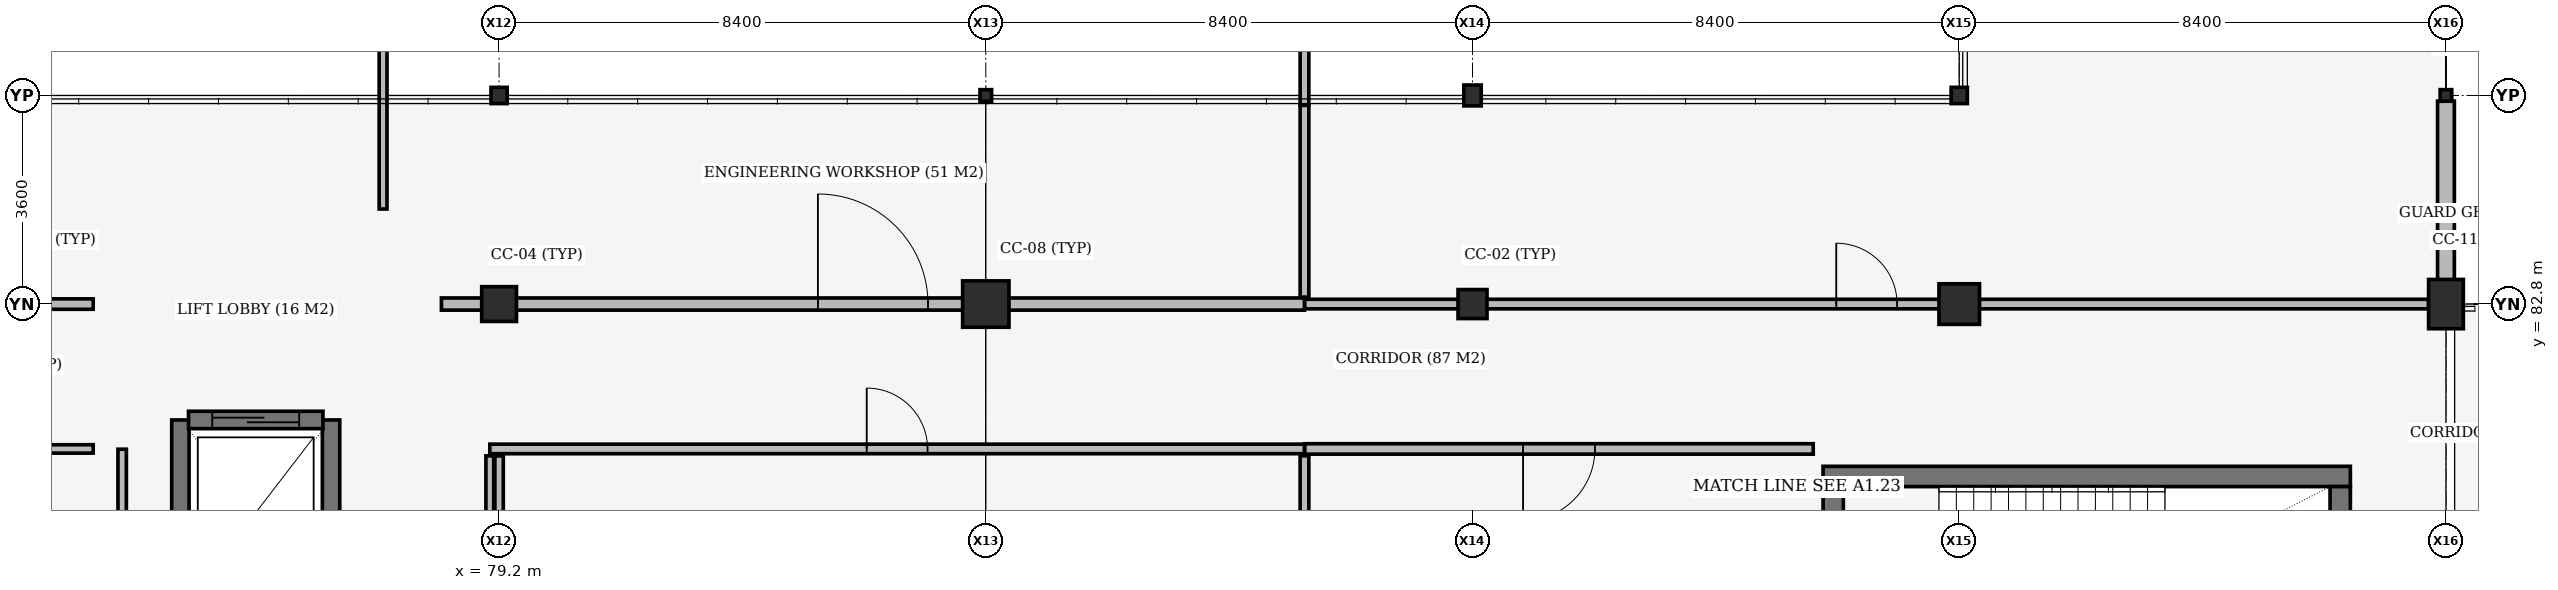
"""IFC4 building model, lengths in metres.
Left out: names, types, materials, properties, quantities, classifications, styles, units other than length and angle.
Written with IfcOpenShell. Run it as: python <this file> out.ifc"""

import sys

from ifc_helpers import new_model, si_unit, direction, frame, frame_2d, origin, origin_2d, place, context, subcontext, project, spatial, rectangle, i_section, extrude, element, fill, save


model = new_model("IFC4")
c1 = context("Model", 3, precision=1e-05, world=origin(), true_north=direction((0.0, 1.0)))
c2 = subcontext(c1, "Body", "Model", "MODEL_VIEW")
j1 = project(units=[si_unit("LENGTHUNIT", "METRE"), si_unit("PLANEANGLEUNIT", "RADIAN")], contexts=[c1])
p1 = place(None, origin())
s1 = spatial("IfcSite", under=j1, at=p1, CompositionType="ELEMENT")
p2 = place(p1, origin())
s2 = spatial("IfcBuilding", under=s1, at=p2, CompositionType="ELEMENT")
p3 = place(p2, frame((0.0, 0.0, 5.4)))
s3 = spatial("IfcBuildingStorey", under=s2, at=p3, CompositionType="ELEMENT", Elevation=5.4)
p4 = place(p3, frame((79.2, 82.8, 0.0), z_axis=(0.0, 0.0, 1.0), x_axis=(1.0, 0.0, 0.0)))
e1 = element("IfcColumn", 1, at=p4, inside=s3, PredefinedType="COLUMN", context=c2, shape_type="SweptSolid", body=[
    extrude(rectangle(XDim=0.6, YDim=0.6, at=origin_2d()), origin(), (0.0, 0.0, 1.0), 3.92),
])
p5 = place(p3, frame((79.2, 86.4, 0.0), z_axis=(0.0, 0.0, 1.0), x_axis=(1.0, 0.0, 0.0)))
e2 = element("IfcColumn", 2, at=p5, inside=s3, PredefinedType="COLUMN", context=c2, shape_type="SweptSolid", body=[
    extrude(i_section(OverallWidth=0.28, OverallDepth=0.28, WebThickness=0.01, FlangeThickness=0.018, FilletRadius=0.024, at=origin_2d()), origin(), (0.0, 0.0, 1.0), 3.92),
])
p6 = place(p3, frame((87.6, 82.8, 0.0), z_axis=(0.0, 0.0, 1.0), x_axis=(1.0, 0.0, 0.0)))
e3 = element("IfcColumn", 3, at=p6, inside=s3, PredefinedType="COLUMN", context=c2, shape_type="SweptSolid", body=[
    extrude(rectangle(XDim=0.8, YDim=0.8, at=origin_2d()), origin(), (0.0, 0.0, 1.0), 3.92),
])
p7 = place(p3, frame((87.6, 86.4, 0.0), z_axis=(0.0, 0.0, 1.0), x_axis=(1.0, 0.0, 0.0)))
e4 = element("IfcColumn", 4, at=p7, inside=s3, PredefinedType="COLUMN", context=c2, shape_type="SweptSolid", body=[
    extrude(i_section(OverallWidth=0.2, OverallDepth=0.2, WebThickness=0.009, FlangeThickness=0.015, FilletRadius=0.018, at=origin_2d()), origin(), (0.0, 0.0, 1.0), 3.92),
])
p8 = place(p3, frame((96.0, 82.8, 0.0), z_axis=(0.0, 0.0, 1.0), x_axis=(1.0, 0.0, 0.0)))
e5 = element("IfcColumn", 5, at=p8, inside=s3, PredefinedType="COLUMN", context=c2, shape_type="SweptSolid", body=[
    extrude(rectangle(XDim=0.5, YDim=0.5, at=origin_2d()), origin(), (0.0, 0.0, 1.0), 3.92),
])
p9 = place(p3, frame((96.0, 86.4, 0.0), z_axis=(0.0, 0.0, 1.0), x_axis=(1.0, 0.0, 0.0)))
e6 = element("IfcColumn", 6, at=p9, inside=s3, PredefinedType="COLUMN", context=c2, shape_type="SweptSolid", body=[
    extrude(i_section(OverallWidth=0.3, OverallDepth=0.36, WebThickness=0.012, FlangeThickness=0.022, FilletRadius=0.027, at=origin_2d()), origin(), (0.0, 0.0, 1.0), 3.92),
])
p10 = place(p3, frame((104.4, 82.8, 0.0), z_axis=(0.0, 0.0, 1.0), x_axis=(1.0, 0.0, 0.0)))
e7 = element("IfcColumn", 7, at=p10, inside=s3, PredefinedType="COLUMN", context=c2, shape_type="SweptSolid", body=[
    extrude(rectangle(XDim=0.7, YDim=0.7, at=origin_2d()), origin(), (0.0, 0.0, 1.0), 3.92),
])
p11 = place(p3, frame((104.4, 86.4, 0.0), z_axis=(0.0, 0.0, 1.0), x_axis=(1.0, 0.0, 0.0)))
e8 = element("IfcColumn", 8, at=p11, inside=s3, PredefinedType="COLUMN", context=c2, shape_type="SweptSolid", body=[
    extrude(i_section(OverallWidth=0.28, OverallDepth=0.28, WebThickness=0.01, FlangeThickness=0.018, FilletRadius=0.024, at=origin_2d()), origin(), (0.0, 0.0, 1.0), 3.92),
])
p12 = place(p3, frame((112.8, 82.8, 0.0), z_axis=(0.0, 0.0, 1.0), x_axis=(1.0, 0.0, 0.0)))
e9 = element("IfcColumn", 9, at=p12, inside=s3, PredefinedType="COLUMN", context=c2, shape_type="SweptSolid", body=[
    extrude(rectangle(XDim=0.6, YDim=0.85, at=origin_2d()), origin(), (0.0, 0.0, 1.0), 3.92),
])
p13 = place(p3, frame((112.8, 86.4, 0.0), z_axis=(0.0, 0.0, 1.0), x_axis=(1.0, 0.0, 0.0)))
e10 = element("IfcColumn", 10, at=p13, inside=s3, PredefinedType="COLUMN", context=c2, shape_type="SweptSolid", body=[
    extrude(i_section(OverallWidth=0.2, OverallDepth=0.2, WebThickness=0.009, FlangeThickness=0.015, FilletRadius=0.018, at=origin_2d()), origin(), (0.0, 0.0, 1.0), 3.92),
])
p14 = place(p3, frame((111.15, 79.825, 0.0), z_axis=(0.0, 0.0, 1.0), x_axis=(-1.0, 0.0, 0.0)))
e11 = element("IfcWall", 11, at=p14, inside=s3, PredefinedType="SHEAR", context=c2, shape_type="SweptSolid", body=[
    extrude(rectangle(XDim=9.1, YDim=0.35, at=frame_2d((4.55, 0.0))), origin(), (0.0, 0.0, 1.0), 3.92),
])
p15 = place(p3, frame((110.975, 76.2, 0.0), z_axis=(0.0, 0.0, 1.0), x_axis=(0.0, 1.0, 0.0)))
e12 = element("IfcWall", 12, at=p15, inside=s3, PredefinedType="SHEAR", context=c2, shape_type="SweptSolid", body=[
    extrude(rectangle(XDim=3.45, YDim=0.35, at=frame_2d((1.725, 0.0))), origin(), (0.0, 0.0, 1.0), 3.92),
])
for number, where, z_axis, x_axis in (
    (13, (73.7, 80.8, 0.0), (0.0, 0.0, 1.0), (0.0, -1.0, 0.0)),
    (14, (76.3, 77.6, 0.0), (0.0, 0.0, 1.0), (0.0, 1.0, 0.0)),
):
    element("IfcWall", number, at=place(p3, frame(where, z_axis=z_axis, x_axis=x_axis)), inside=s3, PredefinedType="SHEAR", context=c2, shape_type="SweptSolid", body=[
        extrude(rectangle(XDim=3.2, YDim=0.3, at=frame_2d((1.6, 0.0))), origin(), (0.0, 0.0, 1.0), 3.92),
    ])
p16 = place(p3, frame((112.8, 86.303, 0.0), z_axis=(0.0, 0.0, 1.0), x_axis=(0.0, -1.0, 0.0)))
e15 = element("IfcWall", 15, at=p16, inside=s3, PredefinedType="STANDARD", context=c2, shape_type="SweptSolid", body=[
    extrude(rectangle(XDim=3.086, YDim=0.29, at=frame_2d((1.543, 0.0))), origin(), (0.0, 0.0, 1.0), 3.53),
])
p17 = place(p3, frame((102.225, 79.65, 0.0), z_axis=(0.0, 0.0, 1.0), x_axis=(0.0, -1.0, 0.0)))
e16 = element("IfcWall", 16, at=p17, inside=s3, PredefinedType="SHEAR", context=c2, shape_type="SweptSolid", body=[
    extrude(rectangle(XDim=3.45, YDim=0.35, at=frame_2d((1.725, 0.0))), origin(), (0.0, 0.0, 1.0), 3.92),
])
p18 = place(p17, frame((1.035, 0.0, 0.0)))
e17 = element("IfcOpeningElement", 17, at=p18, cuts=e16, PredefinedType="OPENING", context=c2, shape_type="SweptSolid", body=[
    extrude(rectangle(XDim=1.38, YDim=2.2, at=frame_2d((0.69, 1.1))), frame((0.0, 0.185, 0.0), z_axis=(0.0, -1.0, 0.0), x_axis=(1.0, 0.0, 0.0)), (0.0, 0.0, 1.0), 0.37),
])
p19 = place(p3, frame((73.84, 80.8, 0.0), z_axis=(0.0, 0.0, 1.0), x_axis=(1.0, 0.0, 0.0)))
e18 = element("IfcWall", 18, at=p19, inside=s3, PredefinedType="SHEAR", context=c2, shape_type="SweptSolid", body=[
    extrude(rectangle(XDim=2.32, YDim=0.3, at=frame_2d((1.16, 0.0))), origin(), (0.0, 0.0, 1.0), 3.92),
])
p20 = place(p19, frame((0.41, 0.0, 0.0)))
e19 = element("IfcOpeningElement", 19, at=p20, cuts=e18, PredefinedType="OPENING", context=c2, shape_type="SweptSolid", body=[
    extrude(rectangle(XDim=1.5, YDim=2.2, at=frame_2d((0.75, 1.1))), frame((0.0, 0.16, 0.0), z_axis=(0.0, -1.0, 0.0), x_axis=(1.0, 0.0, 0.0)), (0.0, 0.0, 1.0), 0.32),
])
p21 = place(p3, frame((69.2, 80.3, 0.0), z_axis=(0.0, 0.0, 1.0), x_axis=(1.0, 0.0, 0.0)))
e20 = element("IfcWall", 20, at=p21, inside=s3, PredefinedType="PLUMBINGWALL", context=c2, shape_type="SweptSolid", body=[
    extrude(rectangle(XDim=2.995, YDim=0.145, at=frame_2d((1.498, 0.0))), origin(), (0.0, 0.0, 1.0), 3.749),
])
p22 = place(p21, frame((1.048, 0.0, 0.0)))
e21 = element("IfcOpeningElement", 21, at=p22, cuts=e20, PredefinedType="OPENING", context=c2, shape_type="SweptSolid", body=[
    extrude(rectangle(XDim=0.9, YDim=2.1, at=frame_2d((0.45, 1.05))), frame((0.0, 0.083, 0.0), z_axis=(0.0, -1.0, 0.0), x_axis=(1.0, 0.0, 0.0)), (0.0, 0.0, 1.0), 0.165),
])
p23 = place(p3, frame((79.2, 76.4, 0.0), z_axis=(0.0, 0.0, 1.0), x_axis=(0.0, 1.0, 0.0)))
e22 = element("IfcWall", 22, at=p23, inside=s3, PredefinedType="PLUMBINGWALL", context=c2, shape_type="SweptSolid", body=[
    extrude(rectangle(XDim=3.78, YDim=0.145, at=frame_2d((1.89, 0.0))), origin(), (0.0, 0.0, 1.0), 3.67),
])
p24 = place(p3, frame((79.04, 80.3, 0.0), z_axis=(0.0, 0.0, 1.0), x_axis=(1.0, 0.0, 0.0)))
e23 = element("IfcWall", 23, at=p24, inside=s3, PredefinedType="PARTITIONING", context=c2, shape_type="SweptSolid", body=[
    extrude(rectangle(XDim=14.06, YDim=0.165, at=frame_2d((7.03, 0.0))), origin(), (0.0, 0.0, 1.0), 3.56),
])
p25 = place(p24, frame((6.505, 0.0, 0.0)))
e24 = element("IfcOpeningElement", 24, at=p25, cuts=e23, PredefinedType="OPENING", context=c2, shape_type="SweptSolid", body=[
    extrude(rectangle(XDim=1.05, YDim=2.2, at=frame_2d((0.525, 1.1))), frame((0.0, 0.093, 0.0), z_axis=(0.0, -1.0, 0.0), x_axis=(1.0, 0.0, 0.0)), (0.0, 0.0, 1.0), 0.185),
])
p26 = place(p3, frame((79.04, 75.85, 0.0), z_axis=(0.0, 0.0, 1.0), x_axis=(0.0, 1.0, 0.0)))
e25 = element("IfcWall", 25, at=p26, inside=s3, PredefinedType="PARTITIONING", context=c2, shape_type="SweptSolid", body=[
    extrude(rectangle(XDim=4.33, YDim=0.135, at=frame_2d((2.165, 0.0))), origin(), (0.0, 0.0, 1.0), 3.67),
])
p27 = place(p3, frame((93.1, 75.85, 0.0), z_axis=(0.0, 0.0, 1.0), x_axis=(0.0, 1.0, 0.0)))
e26 = element("IfcWall", 26, at=p27, inside=s3, PredefinedType="PARTITIONING", context=c2, shape_type="SweptSolid", body=[
    extrude(rectangle(XDim=4.33, YDim=0.15, at=frame_2d((2.165, 0.0))), origin(), (0.0, 0.0, 1.0), 3.56),
])
p28 = place(p3, frame((93.105, 80.3, 0.0), z_axis=(0.0, 0.0, 1.0), x_axis=(1.0, 0.0, 0.0)))
e27 = element("IfcWall", 27, at=p28, inside=s3, PredefinedType="PARTITIONING", context=c2, shape_type="SweptSolid", body=[
    extrude(rectangle(XDim=8.775, YDim=0.18, at=frame_2d((4.387, 0.0))), origin(), (0.0, 0.0, 1.0), 3.47),
])
p29 = place(p28, frame((3.768, 0.0, 0.0)))
e28 = element("IfcOpeningElement", 28, at=p29, cuts=e27, PredefinedType="OPENING", context=c2, shape_type="SweptSolid", body=[
    extrude(rectangle(XDim=1.24, YDim=2.25, at=frame_2d((0.62, 1.125))), frame((0.0, 0.1, 0.0), z_axis=(0.0, -1.0, 0.0), x_axis=(1.0, 0.0, 0.0)), (0.0, 0.0, 1.0), 0.2),
])
p30 = place(p3, frame((54.3, 82.8, 0.0), z_axis=(0.0, 0.0, 1.0), x_axis=(1.0, 0.0, 0.0)))
e29 = element("IfcWall", 29, at=p30, inside=s3, PredefinedType="PARTITIONING", context=c2, shape_type="SweptSolid", body=[
    extrude(rectangle(XDim=17.895, YDim=0.18, at=frame_2d((8.948, 0.0))), origin(), (0.0, 0.0, 1.0), 3.53),
])
p31 = place(p30, frame((5.836, 0.0, 0.0)))
e30 = element("IfcOpeningElement", 30, at=p31, cuts=e29, PredefinedType="OPENING", context=c2, shape_type="SweptSolid", body=[
    extrude(rectangle(XDim=1.22, YDim=2.25, at=frame_2d((0.61, 1.125))), frame((0.0, 0.1, 0.0), z_axis=(0.0, -1.0, 0.0), x_axis=(1.0, 0.0, 0.0)), (0.0, 0.0, 1.0), 0.2),
])
p32 = place(p3, frame((77.198, 84.44, 0.0), z_axis=(0.0, 0.0, 1.0), x_axis=(0.0, 1.0, 0.0)))
e31 = element("IfcWall", 31, at=p32, inside=s3, PredefinedType="PARTITIONING", context=c2, shape_type="SweptSolid", body=[
    extrude(rectangle(XDim=23.31, YDim=0.135, at=frame_2d((11.655, 0.0))), origin(), (0.0, 0.0, 1.0), 3.125),
])
p33 = place(p3, frame((78.205, 82.8, 0.0), z_axis=(0.0, 0.0, 1.0), x_axis=(1.0, 0.0, 0.0)))
e32 = element("IfcWall", 32, at=p33, inside=s3, PredefinedType="STANDARD", context=c2, shape_type="SweptSolid", body=[
    extrude(rectangle(XDim=14.895, YDim=0.21, at=frame_2d((7.448, 0.0))), origin(), (0.0, 0.0, 1.0), 3.53),
])
p34 = place(p33, frame((6.498, 0.0, 0.0)))
e33 = element("IfcOpeningElement", 33, at=p34, cuts=e32, PredefinedType="OPENING", context=c2, shape_type="SweptSolid", body=[
    extrude(rectangle(XDim=1.9, YDim=2.35, at=frame_2d((0.95, 1.175))), frame((0.0, 0.115, 0.0), z_axis=(0.0, -1.0, 0.0), x_axis=(1.0, 0.0, 0.0)), (0.0, 0.0, 1.0), 0.23),
])
p35 = place(p3, frame((93.1, 82.92, 0.0), z_axis=(0.0, 0.0, 1.0), x_axis=(0.0, 1.0, 0.0)))
e34 = element("IfcWall", 34, at=p35, inside=s3, PredefinedType="PARTITIONING", context=c2, shape_type="SweptSolid", body=[
    extrude(rectangle(XDim=3.31, YDim=0.15, at=frame_2d((1.655, 0.0))), origin(), (0.0, 0.0, 1.0), 3.63),
])
p36 = place(p3, frame((93.105, 82.8, 0.0), z_axis=(0.0, 0.0, 1.0), x_axis=(1.0, 0.0, 0.0)))
e35 = element("IfcWall", 35, at=p36, inside=s3, PredefinedType="PARTITIONING", context=c2, shape_type="SweptSolid", body=[
    extrude(rectangle(XDim=19.395, YDim=0.165, at=frame_2d((9.698, 0.0))), origin(), (0.0, 0.0, 1.0), 3.59),
])
p37 = place(p36, frame((9.173, 0.0, 0.0)))
e36 = element("IfcOpeningElement", 36, at=p37, cuts=e35, PredefinedType="OPENING", context=c2, shape_type="SweptSolid", body=[
    extrude(rectangle(XDim=1.05, YDim=2.2, at=frame_2d((0.525, 1.1))), frame((0.0, 0.093, 0.0), z_axis=(0.0, -1.0, 0.0), x_axis=(1.0, 0.0, 0.0)), (0.0, 0.0, 1.0), 0.185),
])
p38 = place(p3, frame((93.1, 86.235, 0.0), z_axis=(0.0, 0.0, 1.0), x_axis=(0.0, 1.0, 0.0)))
e37 = element("IfcWall", 37, at=p38, inside=s3, PredefinedType="PARTITIONING", context=c2, shape_type="SweptSolid", body=[
    extrude(rectangle(XDim=21.515, YDim=0.15, at=frame_2d((10.757, 0.0))), origin(), (0.0, 0.0, 1.0), 3.125),
])
p39 = place(p3, frame((72.695, 76.405, 0.0), z_axis=(0.0, 0.0, 1.0), x_axis=(0.0, 1.0, 0.0)))
e38 = element("IfcWall", 38, at=p39, inside=s3, PredefinedType="PLUMBINGWALL", context=c2, shape_type="SweptSolid", body=[
    extrude(rectangle(XDim=3.89, YDim=0.145, at=frame_2d((1.945, 0.0))), origin(), (0.0, 0.0, 1.0), 3.92),
])
p40 = place(p20, origin())
e39 = element("IfcDoor", 39, at=p40, inside=s3, OperationType="SLIDING_TO_LEFT", PredefinedType="DOOR", context=c2, shape_type="SweptSolid", body=[
    extrude(rectangle(XDim=1.5, YDim=2.2, at=frame_2d((0.75, 1.1))), frame((0.0, 0.025, 0.0), z_axis=(0.0, -1.0, 0.0), x_axis=(1.0, 0.0, 0.0)), (0.0, 0.0, 1.0), 0.05),
])
fill(e19, e39)
p41 = place(p25, origin())
e40 = element("IfcDoor", 40, at=p41, inside=s3, OperationType="SINGLE_SWING_LEFT", PredefinedType="DOOR", context=c2, shape_type="SweptSolid", body=[
    extrude(rectangle(XDim=1.05, YDim=2.2, at=frame_2d((0.525, 1.1))), frame((0.0, 0.025, 0.0), z_axis=(0.0, -1.0, 0.0), x_axis=(1.0, 0.0, 0.0)), (0.0, 0.0, 1.0), 0.05),
])
fill(e24, e40)
p42 = place(p29, origin())
e41 = element("IfcDoor", 41, at=p42, inside=s3, OperationType="SINGLE_SWING_RIGHT", PredefinedType="DOOR", context=c2, shape_type="SweptSolid", body=[
    extrude(rectangle(XDim=1.24, YDim=2.25, at=frame_2d((0.62, 1.125))), frame((0.0, 0.025, 0.0), z_axis=(0.0, -1.0, 0.0), x_axis=(1.0, 0.0, 0.0)), (0.0, 0.0, 1.0), 0.05),
])
fill(e28, e41)
p43 = place(p34, origin())
e42 = element("IfcDoor", 42, at=p43, inside=s3, OperationType="DOUBLE_DOOR_SINGLE_SWING", PredefinedType="DOOR", context=c2, shape_type="SweptSolid", body=[
    extrude(rectangle(XDim=1.9, YDim=2.35, at=frame_2d((0.95, 1.175))), frame((0.0, 0.025, 0.0), z_axis=(0.0, -1.0, 0.0), x_axis=(1.0, 0.0, 0.0)), (0.0, 0.0, 1.0), 0.05),
])
fill(e33, e42)
p44 = place(p37, origin())
e43 = element("IfcDoor", 43, at=p44, inside=s3, OperationType="SINGLE_SWING_LEFT", PredefinedType="DOOR", context=c2, shape_type="SweptSolid", body=[
    extrude(rectangle(XDim=1.05, YDim=2.2, at=frame_2d((0.525, 1.1))), frame((0.0, 0.025, 0.0), z_axis=(0.0, -1.0, 0.0), x_axis=(1.0, 0.0, 0.0)), (0.0, 0.0, 1.0), 0.05),
])
fill(e36, e43)
save(model, sys.argv[1])
